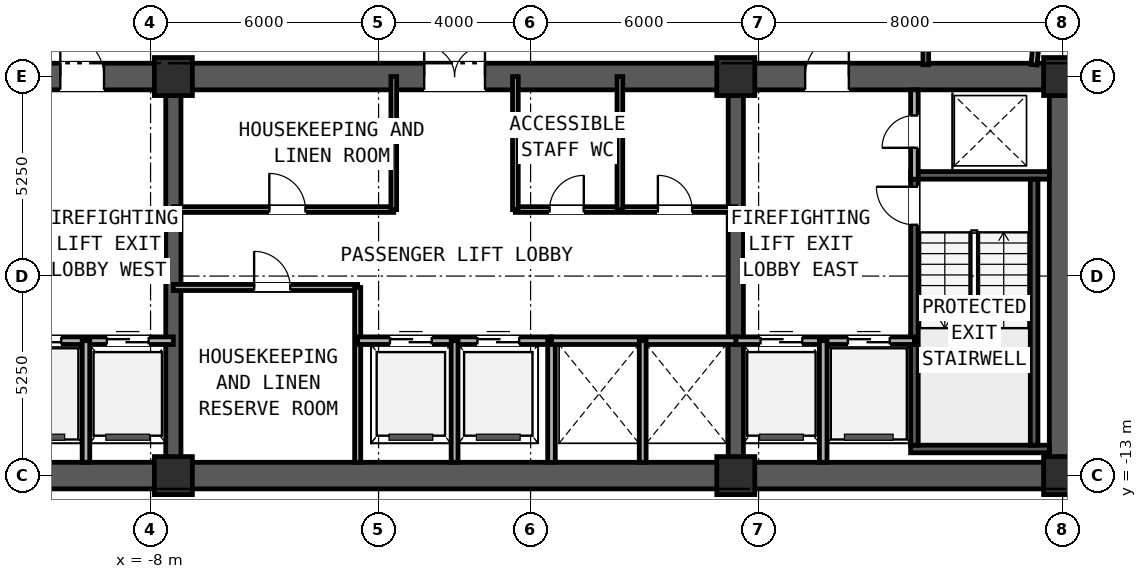
"""IFC4 building model, lengths in metres.
Left out: names, types, materials, properties, quantities, classifications, styles, units other than length and angle.
Written with IfcOpenShell. Run it as: python <this file> out.ifc"""

import sys

from ifc_helpers import new_model, si_unit, direction, frame, frame_2d, origin, origin_2d, place, context, subcontext, project, spatial, rectangle, extrude, element, fill, save


model = new_model("IFC4")
c1 = context("Model", 3, precision=1e-05, world=origin(), true_north=direction((0.0, 1.0)))
c2 = subcontext(c1, "Body", "Model", "MODEL_VIEW")
j1 = project(units=[si_unit("LENGTHUNIT", "METRE"), si_unit("PLANEANGLEUNIT", "RADIAN")], contexts=[c1])
p1 = place(None, origin())
s1 = spatial("IfcSite", under=j1, at=p1, CompositionType="ELEMENT")
p2 = place(p1, origin())
s2 = spatial("IfcBuilding", under=s1, at=p2, CompositionType="ELEMENT")
p3 = place(p2, frame((0.0, 0.0, 142.8)))
s3 = spatial("IfcBuildingStorey", under=s2, at=p3, CompositionType="ELEMENT", Elevation=142.8)
p4 = place(p3, frame((-16.35, -13.0, 0.0), z_axis=(0.0, 0.0, 1.0), x_axis=(1.0, 0.0, 0.0)))
e1 = element("IfcWall", 1, at=p4, inside=s3, PredefinedType="SHEAR", context=c2, shape_type="SweptSolid", body=[
    extrude(rectangle(XDim=32.7, YDim=0.7, at=frame_2d((16.35, 0.0))), origin(), (0.0, 0.0, 1.0), 2.91),
])
p5 = place(p3, frame((-16.35, -2.5, 0.0), z_axis=(0.0, 0.0, 1.0), x_axis=(1.0, 0.0, 0.0)))
e2 = element("IfcWall", 2, at=p5, inside=s3, PredefinedType="SHEAR", context=c2, shape_type="SweptSolid", body=[
    extrude(rectangle(XDim=32.7, YDim=0.7, at=frame_2d((16.35, 0.0))), origin(), (0.0, 0.0, 1.0), 2.91),
])
p6 = place(p5, frame((5.975, 0.0, 0.0)))
e3 = element("IfcOpeningElement", 3, at=p6, cuts=e2, PredefinedType="OPENING", context=c2, shape_type="SweptSolid", body=[
    extrude(rectangle(XDim=1.15, YDim=2.0, at=frame_2d((0.575, 1.0))), frame((0.0, 0.36, 0.0), z_axis=(0.0, -1.0, 0.0), x_axis=(1.0, 0.0, 0.0)), (0.0, 0.0, 1.0), 0.72),
])
p7 = place(p5, frame((15.55, 0.0, 0.0)))
e4 = element("IfcOpeningElement", 4, at=p7, cuts=e2, PredefinedType="OPENING", context=c2, shape_type="SweptSolid", body=[
    extrude(rectangle(XDim=1.6, YDim=2.0, at=frame_2d((0.8, 1.0))), frame((0.0, 0.36, 0.0), z_axis=(0.0, -1.0, 0.0), x_axis=(1.0, 0.0, 0.0)), (0.0, 0.0, 1.0), 0.72),
])
p8 = place(p5, frame((25.575, 0.0, 0.0)))
e5 = element("IfcOpeningElement", 5, at=p8, cuts=e2, PredefinedType="OPENING", context=c2, shape_type="SweptSolid", body=[
    extrude(rectangle(XDim=1.15, YDim=2.0, at=frame_2d((0.575, 1.0))), frame((0.0, 0.36, 0.0), z_axis=(0.0, -1.0, 0.0), x_axis=(1.0, 0.0, 0.0)), (0.0, 0.0, 1.0), 0.72),
])
p9 = place(p3, frame((16.0, -12.65, 0.0), z_axis=(0.0, 0.0, 1.0), x_axis=(0.0, 1.0, 0.0)))
e6 = element("IfcWall", 6, at=p9, inside=s3, PredefinedType="SHEAR", context=c2, shape_type="SweptSolid", body=[
    extrude(rectangle(XDim=9.8, YDim=0.7, at=frame_2d((4.9, 0.0))), origin(), (0.0, 0.0, 1.0), 2.91),
])
for number, where, z_axis, x_axis in (
    (7, (-7.4, -12.65, 0.0), (0.0, 0.0, 1.0), (0.0, 1.0, 0.0)),
    (8, (7.4, -12.65, 0.0), (0.0, 0.0, 1.0), (0.0, 1.0, 0.0)),
):
    element("IfcWall", number, at=place(p3, frame(where, z_axis=z_axis, x_axis=x_axis)), inside=s3, PredefinedType="SHEAR", context=c2, shape_type="SweptSolid", body=[
        extrude(rectangle(XDim=9.8, YDim=0.4, at=frame_2d((4.9, 0.0))), origin(), (0.0, 0.0, 1.0), 3.19),
    ])
for number, where, z_axis, x_axis in (
    (9, (12.0, -12.3, 0.0), (0.0, 0.0, 1.0), (1.0, 0.0, 0.0)),
    (10, (12.0, -5.1, 0.0), (0.0, 0.0, 1.0), (1.0, 0.0, 0.0)),
):
    element("IfcWall", number, at=place(p3, frame(where, z_axis=z_axis, x_axis=x_axis)), inside=s3, PredefinedType="SOLIDWALL", context=c2, shape_type="SweptSolid", body=[
        extrude(rectangle(XDim=3.65, YDim=0.2, at=frame_2d((1.825, 0.0))), origin(), (0.0, 0.0, 1.0), 3.19),
    ])
p10 = place(p3, frame((12.1, -12.2, 0.0), z_axis=(0.0, 0.0, 1.0), x_axis=(0.0, 1.0, 0.0)))
e11 = element("IfcWall", 11, at=p10, inside=s3, PredefinedType="SOLIDWALL", context=c2, shape_type="SweptSolid", body=[
    extrude(rectangle(XDim=7.0, YDim=0.2, at=frame_2d((3.5, 0.0))), origin(), (0.0, 0.0, 1.0), 3.19),
])
p11 = place(p10, frame((5.8, 0.0, 0.0)))
e12 = element("IfcOpeningElement", 12, at=p11, cuts=e11, PredefinedType="OPENING", context=c2, shape_type="SweptSolid", body=[
    extrude(rectangle(XDim=1.0, YDim=2.1, at=frame_2d((0.5, 1.05))), frame((0.0, 0.11, 0.0), z_axis=(0.0, -1.0, 0.0), x_axis=(1.0, 0.0, 0.0)), (0.0, 0.0, 1.0), 0.22),
])
p12 = place(p3, frame((15.25, -12.2, 0.0), z_axis=(0.0, 0.0, 1.0), x_axis=(0.0, 1.0, 0.0)))
e13 = element("IfcWall", 13, at=p12, inside=s3, PredefinedType="SOLIDWALL", context=c2, shape_type="SweptSolid", body=[
    extrude(rectangle(XDim=7.0, YDim=0.2, at=frame_2d((3.5, 0.0))), origin(), (0.0, 0.0, 1.0), 3.19),
])
for number, where, z_axis, x_axis in (
    (14, (-7.4, -13.0, 0.0), (0.0, 0.0, 1.0), (1.0, 0.0, 0.0)),
    (15, (7.4, -13.0, 0.0), (0.0, 0.0, 1.0), (1.0, 0.0, 0.0)),
    (16, (16.0, -13.0, 0.0), (0.0, 0.0, 1.0), (1.0, 0.0, 0.0)),
    (17, (-7.4, -2.5, 0.0), (0.0, 0.0, 1.0), (1.0, 0.0, 0.0)),
    (18, (7.4, -2.5, 0.0), (0.0, 0.0, 1.0), (1.0, 0.0, 0.0)),
    (19, (16.0, -2.5, 0.0), (0.0, 0.0, 1.0), (1.0, 0.0, 0.0)),
):
    element("IfcColumn", number, at=place(p3, frame(where, z_axis=z_axis, x_axis=x_axis)), inside=s3, PredefinedType="COLUMN", context=c2, shape_type="SweptSolid", body=[
        extrude(rectangle(XDim=1.0, YDim=1.0, at=origin_2d()), origin(), (0.0, 0.0, 1.0), 3.45),
    ])
p13 = place(p3, frame((-26.695, -13.016, 0.0), z_axis=(0.0, 0.0, 1.0), x_axis=(0.995396268366, -0.095845025554, 0.0)))
e20 = element("IfcWall", 20, at=p13, inside=s3, PredefinedType="STANDARD", context=c2, shape_type="SweptSolid", body=[
    extrude(rectangle(XDim=49.6, YDim=0.24, at=frame_2d((24.8, 0.0))), origin(), (0.0, 0.0, 1.0), 3.19),
])
p14 = place(p13, frame((6.044, 0.0, 0.7)))
e21 = element("IfcOpeningElement", 21, at=p14, cuts=e20, PredefinedType="OPENING", context=c2, shape_type="SweptSolid", body=[
    extrude(rectangle(XDim=1.8, YDim=1.5, at=frame_2d((0.9, 0.75))), frame((0.0, 0.13, 0.0), z_axis=(0.0, -1.0, 0.0), x_axis=(1.0, 0.0, 0.0)), (0.0, 0.0, 1.0), 0.26),
])
p15 = place(p13, frame((41.756, 0.0, 0.7)))
e22 = element("IfcOpeningElement", 22, at=p15, cuts=e20, PredefinedType="OPENING", context=c2, shape_type="SweptSolid", body=[
    extrude(rectangle(XDim=1.8, YDim=1.5, at=frame_2d((0.9, 0.75))), frame((0.0, 0.13, 0.0), z_axis=(0.0, -1.0, 0.0), x_axis=(1.0, 0.0, 0.0)), (0.0, 0.0, 1.0), 0.26),
])
p16 = place(p3, frame((12.1, -5.2, 0.0), z_axis=(0.0, 0.0, 1.0), x_axis=(0.0, 1.0, 0.0)))
e23 = element("IfcWall", 23, at=p16, inside=s3, PredefinedType="PARTITIONING", context=c2, shape_type="SweptSolid", body=[
    extrude(rectangle(XDim=2.35, YDim=0.2, at=frame_2d((1.175, 0.0))), origin(), (0.0, 0.0, 1.0), 2.225),
])
p17 = place(p16, frame((0.825, 0.0, 0.0)))
e24 = element("IfcOpeningElement", 24, at=p17, cuts=e23, PredefinedType="OPENING", context=c2, shape_type="SweptSolid", body=[
    extrude(rectangle(XDim=0.85, YDim=2.05, at=frame_2d((0.425, 1.025))), frame((0.0, 0.11, 0.0), z_axis=(0.0, -1.0, 0.0), x_axis=(1.0, 0.0, 0.0)), (0.0, 0.0, 1.0), 0.22),
])
p18 = place(p3, frame((-12.1, -9.45, 0.0), z_axis=(0.0, 0.0, 1.0), x_axis=(1.0, 0.0, 0.0)))
e25 = element("IfcWall", 25, at=p18, inside=s3, PredefinedType="PARTITIONING", context=c2, shape_type="SweptSolid", body=[
    extrude(rectangle(XDim=4.7, YDim=0.2, at=frame_2d((2.35, 0.0))), origin(), (0.0, 0.0, 1.0), 3.19),
])
p19 = place(p18, frame((0.65, 0.0, 0.0)))
e26 = element("IfcOpeningElement", 26, at=p19, cuts=e25, PredefinedType="OPENING", context=c2, shape_type="SweptSolid", body=[
    extrude(rectangle(XDim=1.1, YDim=2.2, at=frame_2d((0.55, 1.1))), frame((0.0, 0.11, 0.0), z_axis=(0.0, -1.0, 0.0), x_axis=(1.0, 0.0, 0.0)), (0.0, 0.0, 1.0), 0.22),
])
p20 = place(p18, frame((2.95, 0.0, 0.0)))
e27 = element("IfcOpeningElement", 27, at=p20, cuts=e25, PredefinedType="OPENING", context=c2, shape_type="SweptSolid", body=[
    extrude(rectangle(XDim=1.1, YDim=2.2, at=frame_2d((0.55, 1.1))), frame((0.0, 0.11, 0.0), z_axis=(0.0, -1.0, 0.0), x_axis=(1.0, 0.0, 0.0)), (0.0, 0.0, 1.0), 0.22),
])
p21 = place(p3, frame((-9.7, -12.65, 0.0), z_axis=(0.0, 0.0, 1.0), x_axis=(0.0, 1.0, 0.0)))
e28 = element("IfcWall", 28, at=p21, inside=s3, PredefinedType="PARTITIONING", context=c2, shape_type="SweptSolid", body=[
    extrude(rectangle(XDim=3.2, YDim=0.2, at=frame_2d((1.6, 0.0))), origin(), (0.0, 0.0, 1.0), 2.225),
])
p22 = place(p3, frame((7.4, -9.45, 0.0), z_axis=(0.0, 0.0, 1.0), x_axis=(1.0, 0.0, 0.0)))
e29 = element("IfcWall", 29, at=p22, inside=s3, PredefinedType="PARTITIONING", context=c2, shape_type="SweptSolid", body=[
    extrude(rectangle(XDim=4.7, YDim=0.2, at=frame_2d((2.35, 0.0))), origin(), (0.0, 0.0, 1.0), 3.19),
])
p23 = place(p22, frame((2.95, 0.0, 0.0)))
e30 = element("IfcOpeningElement", 30, at=p23, cuts=e29, PredefinedType="OPENING", context=c2, shape_type="SweptSolid", body=[
    extrude(rectangle(XDim=1.1, YDim=2.2, at=frame_2d((0.55, 1.1))), frame((0.0, 0.11, 0.0), z_axis=(0.0, -1.0, 0.0), x_axis=(1.0, 0.0, 0.0)), (0.0, 0.0, 1.0), 0.22),
])
p24 = place(p22, frame((0.65, 0.0, 0.0)))
e31 = element("IfcOpeningElement", 31, at=p24, cuts=e29, PredefinedType="OPENING", context=c2, shape_type="SweptSolid", body=[
    extrude(rectangle(XDim=1.1, YDim=2.2, at=frame_2d((0.55, 1.1))), frame((0.0, 0.11, 0.0), z_axis=(0.0, -1.0, 0.0), x_axis=(1.0, 0.0, 0.0)), (0.0, 0.0, 1.0), 0.22),
])
p25 = place(p3, frame((9.7, -12.65, 0.0), z_axis=(0.0, 0.0, 1.0), x_axis=(0.0, 1.0, 0.0)))
e32 = element("IfcWall", 32, at=p25, inside=s3, PredefinedType="PARTITIONING", context=c2, shape_type="SweptSolid", body=[
    extrude(rectangle(XDim=3.2, YDim=0.2, at=frame_2d((1.6, 0.0))), origin(), (0.0, 0.0, 1.0), 2.225),
])
p26 = place(p3, frame((-7.4, -8.05, 0.0), z_axis=(0.0, 0.0, 1.0), x_axis=(1.0, 0.0, 0.0)))
e33 = element("IfcWall", 33, at=p26, inside=s3, PredefinedType="PARTITIONING", context=c2, shape_type="SweptSolid", body=[
    extrude(rectangle(XDim=4.85, YDim=0.16, at=frame_2d((2.425, 0.0))), origin(), (0.0, 0.0, 1.0), 3.19),
])
p27 = place(p26, frame((2.125, 0.0, 0.0)))
e34 = element("IfcOpeningElement", 34, at=p27, cuts=e33, PredefinedType="OPENING", context=c2, shape_type="SweptSolid", body=[
    extrude(rectangle(XDim=0.95, YDim=2.15, at=frame_2d((0.475, 1.075))), frame((0.0, 0.09, 0.0), z_axis=(0.0, -1.0, 0.0), x_axis=(1.0, 0.0, 0.0)), (0.0, 0.0, 1.0), 0.18),
])
p28 = place(p3, frame((-2.55, -12.65, 0.0), z_axis=(0.0, 0.0, 1.0), x_axis=(0.0, 1.0, 0.0)))
e35 = element("IfcWall", 35, at=p28, inside=s3, PredefinedType="PARTITIONING", context=c2, shape_type="SweptSolid", body=[
    extrude(rectangle(XDim=4.6, YDim=0.16, at=frame_2d((2.3, 0.0))), origin(), (0.0, 0.0, 1.0), 2.225),
])
p29 = place(p3, frame((-2.55, -9.45, 0.0), z_axis=(0.0, 0.0, 1.0), x_axis=(1.0, 0.0, 0.0)))
e36 = element("IfcWall", 36, at=p29, inside=s3, PredefinedType="PARTITIONING", context=c2, shape_type="SweptSolid", body=[
    extrude(rectangle(XDim=5.1, YDim=0.2, at=frame_2d((2.55, 0.0))), origin(), (0.0, 0.0, 1.0), 3.19),
])
p30 = place(p29, frame((0.85, 0.0, 0.0)))
e37 = element("IfcOpeningElement", 37, at=p30, cuts=e36, PredefinedType="OPENING", context=c2, shape_type="SweptSolid", body=[
    extrude(rectangle(XDim=1.1, YDim=2.2, at=frame_2d((0.55, 1.1))), frame((0.0, 0.11, 0.0), z_axis=(0.0, -1.0, 0.0), x_axis=(1.0, 0.0, 0.0)), (0.0, 0.0, 1.0), 0.22),
])
p31 = place(p29, frame((3.15, 0.0, 0.0)))
e38 = element("IfcOpeningElement", 38, at=p31, cuts=e36, PredefinedType="OPENING", context=c2, shape_type="SweptSolid", body=[
    extrude(rectangle(XDim=1.1, YDim=2.2, at=frame_2d((0.55, 1.1))), frame((0.0, 0.11, 0.0), z_axis=(0.0, -1.0, 0.0), x_axis=(1.0, 0.0, 0.0)), (0.0, 0.0, 1.0), 0.22),
])
p32 = place(p3, frame((0.0, -12.65, 0.0), z_axis=(0.0, 0.0, 1.0), x_axis=(0.0, 1.0, 0.0)))
e39 = element("IfcWall", 39, at=p32, inside=s3, PredefinedType="PARTITIONING", context=c2, shape_type="SweptSolid", body=[
    extrude(rectangle(XDim=3.2, YDim=0.18, at=frame_2d((1.6, 0.0))), origin(), (0.0, 0.0, 1.0), 2.225),
])
p33 = place(p3, frame((2.55, -12.65, 0.0), z_axis=(0.0, 0.0, 1.0), x_axis=(0.0, 1.0, 0.0)))
e40 = element("IfcWall", 40, at=p33, inside=s3, PredefinedType="PARTITIONING", context=c2, shape_type="SweptSolid", body=[
    extrude(rectangle(XDim=3.2, YDim=0.2, at=frame_2d((1.6, 0.0))), origin(), (0.0, 0.0, 1.0), 2.225),
])
p34 = place(p3, frame((2.55, -9.45, 0.0), z_axis=(0.0, 0.0, 1.0), x_axis=(1.0, 0.0, 0.0)))
e41 = element("IfcWall", 41, at=p34, inside=s3, PredefinedType="PARTITIONING", context=c2, shape_type="SweptSolid", body=[
    extrude(rectangle(XDim=4.85, YDim=0.2, at=frame_2d((2.425, 0.0))), origin(), (0.0, 0.0, 1.0), 3.19),
])
p35 = place(p3, frame((4.95, -12.65, 0.0), z_axis=(0.0, 0.0, 1.0), x_axis=(0.0, 1.0, 0.0)))
e42 = element("IfcWall", 42, at=p35, inside=s3, PredefinedType="PARTITIONING", context=c2, shape_type="SweptSolid", body=[
    extrude(rectangle(XDim=3.2, YDim=0.18, at=frame_2d((1.6, 0.0))), origin(), (0.0, 0.0, 1.0), 2.225),
])
p36 = place(p3, frame((-7.4, -6.0, 0.0), z_axis=(0.0, 0.0, 1.0), x_axis=(1.0, 0.0, 0.0)))
e43 = element("IfcWall", 43, at=p36, inside=s3, PredefinedType="PARTITIONING", context=c2, shape_type="SweptSolid", body=[
    extrude(rectangle(XDim=5.8, YDim=0.15, at=frame_2d((2.9, 0.0))), origin(), (0.0, 0.0, 1.0), 3.19),
])
p37 = place(p36, frame((2.525, 0.0, 0.0)))
e44 = element("IfcOpeningElement", 44, at=p37, cuts=e43, PredefinedType="OPENING", context=c2, shape_type="SweptSolid", body=[
    extrude(rectangle(XDim=0.95, YDim=2.15, at=frame_2d((0.475, 1.075))), frame((0.0, 0.085, 0.0), z_axis=(0.0, -1.0, 0.0), x_axis=(1.0, 0.0, 0.0)), (0.0, 0.0, 1.0), 0.17),
])
p38 = place(p3, frame((-1.6, -6.0, 0.0), z_axis=(0.0, 0.0, 1.0), x_axis=(0.0, 1.0, 0.0)))
e45 = element("IfcWall", 45, at=p38, inside=s3, PredefinedType="PARTITIONING", context=c2, shape_type="SweptSolid", body=[
    extrude(rectangle(XDim=3.5, YDim=0.15, at=frame_2d((1.75, 0.0))), origin(), (0.0, 0.0, 1.0), 2.225),
])
p39 = place(p3, frame((1.6, -6.0, 0.0), z_axis=(0.0, 0.0, 1.0), x_axis=(1.0, 0.0, 0.0)))
e46 = element("IfcWall", 46, at=p39, inside=s3, PredefinedType="PARTITIONING", context=c2, shape_type="SweptSolid", body=[
    extrude(rectangle(XDim=5.8, YDim=0.15, at=frame_2d((2.9, 0.0))), origin(), (0.0, 0.0, 1.0), 3.19),
])
p40 = place(p39, frame((0.9, 0.0, 0.0)))
e47 = element("IfcOpeningElement", 47, at=p40, cuts=e46, PredefinedType="OPENING", context=c2, shape_type="SweptSolid", body=[
    extrude(rectangle(XDim=0.9, YDim=2.1, at=frame_2d((0.45, 1.05))), frame((0.0, 0.085, 0.0), z_axis=(0.0, -1.0, 0.0), x_axis=(1.0, 0.0, 0.0)), (0.0, 0.0, 1.0), 0.17),
])
p41 = place(p39, frame((3.75, 0.0, 0.0)))
e48 = element("IfcOpeningElement", 48, at=p41, cuts=e46, PredefinedType="OPENING", context=c2, shape_type="SweptSolid", body=[
    extrude(rectangle(XDim=0.9, YDim=2.1, at=frame_2d((0.45, 1.05))), frame((0.0, 0.085, 0.0), z_axis=(0.0, -1.0, 0.0), x_axis=(1.0, 0.0, 0.0)), (0.0, 0.0, 1.0), 0.17),
])
for number, where, z_axis, x_axis in (
    (49, (1.6, -6.0, 0.0), (0.0, 0.0, 1.0), (0.0, 1.0, 0.0)),
    (50, (4.35, -6.0, 0.0), (0.0, 0.0, 1.0), (0.0, 1.0, 0.0)),
):
    element("IfcWall", number, at=place(p3, frame(where, z_axis=z_axis, x_axis=x_axis)), inside=s3, PredefinedType="PARTITIONING", context=c2, shape_type="SweptSolid", body=[
        extrude(rectangle(XDim=3.5, YDim=0.15, at=frame_2d((1.75, 0.0))), origin(), (0.0, 0.0, 1.0), 2.225),
    ])
p42 = place(p3, frame((12.4, 0.59, 0.0), z_axis=(0.0, 0.0, 1.0), x_axis=(0.0, -1.0, 0.0)))
e51 = element("IfcWall", 51, at=p42, inside=s3, PredefinedType="PARTITIONING", context=c2, shape_type="SweptSolid", body=[
    extrude(rectangle(XDim=2.78, YDim=0.15, at=frame_2d((1.39, 0.0))), origin(), (0.0, 0.0, 1.0), 2.225),
])
p43 = place(p3, frame((15.823, 3.79, 0.0), z_axis=(0.0, 0.0, 1.0), x_axis=(-0.095865726078, -0.99539427493, 0.0)))
e52 = element("IfcWall", 52, at=p43, inside=s3, PredefinedType="PARTITIONING", context=c2, shape_type="SweptSolid", body=[
    extrude(rectangle(XDim=6.008, YDim=0.16, at=frame_2d((3.004, 0.0))), origin(), (0.0, 0.0, 1.0), 2.225),
])
p44 = place(p11, origin())
e53 = element("IfcDoor", 53, at=p44, inside=s3, OperationType="SINGLE_SWING_RIGHT", PredefinedType="DOOR", context=c2, shape_type="SweptSolid", body=[
    extrude(rectangle(XDim=1.0, YDim=2.1, at=frame_2d((0.5, 1.05))), frame((0.0, 0.025, 0.0), z_axis=(0.0, -1.0, 0.0), x_axis=(1.0, 0.0, 0.0)), (0.0, 0.0, 1.0), 0.05),
])
fill(e12, e53)
p45 = place(p17, frame((0.85, 0.0, 0.0), z_axis=(0.0, 0.0, 1.0), x_axis=(-1.0, 0.0, 0.0)))
e54 = element("IfcDoor", 54, at=p45, inside=s3, OperationType="SINGLE_SWING_LEFT", PredefinedType="DOOR", context=c2, shape_type="SweptSolid", body=[
    extrude(rectangle(XDim=0.85, YDim=2.05, at=frame_2d((0.425, 1.025))), frame((0.0, 0.025, 0.0), z_axis=(0.0, -1.0, 0.0), x_axis=(1.0, 0.0, 0.0)), (0.0, 0.0, 1.0), 0.05),
])
fill(e24, e54)
p46 = place(p19, origin())
e55 = element("IfcDoor", 55, at=p46, inside=s3, OperationType="SLIDING_TO_LEFT", PredefinedType="DOOR", context=c2, shape_type="SweptSolid", body=[
    extrude(rectangle(XDim=1.1, YDim=2.2, at=frame_2d((0.55, 1.1))), frame((0.0, 0.025, 0.0), z_axis=(0.0, -1.0, 0.0), x_axis=(1.0, 0.0, 0.0)), (0.0, 0.0, 1.0), 0.05),
])
fill(e26, e55)
p47 = place(p20, origin())
e56 = element("IfcDoor", 56, at=p47, inside=s3, OperationType="SLIDING_TO_RIGHT", PredefinedType="DOOR", context=c2, shape_type="SweptSolid", body=[
    extrude(rectangle(XDim=1.1, YDim=2.2, at=frame_2d((0.55, 1.1))), frame((0.0, 0.025, 0.0), z_axis=(0.0, -1.0, 0.0), x_axis=(1.0, 0.0, 0.0)), (0.0, 0.0, 1.0), 0.05),
])
fill(e27, e56)
p48 = place(p23, origin())
e57 = element("IfcDoor", 57, at=p48, inside=s3, OperationType="SLIDING_TO_LEFT", PredefinedType="DOOR", context=c2, shape_type="SweptSolid", body=[
    extrude(rectangle(XDim=1.1, YDim=2.2, at=frame_2d((0.55, 1.1))), frame((0.0, 0.025, 0.0), z_axis=(0.0, -1.0, 0.0), x_axis=(1.0, 0.0, 0.0)), (0.0, 0.0, 1.0), 0.05),
])
fill(e30, e57)
p49 = place(p24, origin())
e58 = element("IfcDoor", 58, at=p49, inside=s3, OperationType="SLIDING_TO_RIGHT", PredefinedType="DOOR", context=c2, shape_type="SweptSolid", body=[
    extrude(rectangle(XDim=1.1, YDim=2.2, at=frame_2d((0.55, 1.1))), frame((0.0, 0.025, 0.0), z_axis=(0.0, -1.0, 0.0), x_axis=(1.0, 0.0, 0.0)), (0.0, 0.0, 1.0), 0.05),
])
fill(e31, e58)
p50 = place(p6, origin())
e59 = element("IfcDoor", 59, at=p50, inside=s3, OperationType="SINGLE_SWING_LEFT", PredefinedType="DOOR", context=c2, shape_type="SweptSolid", body=[
    extrude(rectangle(XDim=1.15, YDim=2.0, at=frame_2d((0.575, 1.0))), frame((0.0, 0.025, 0.0), z_axis=(0.0, -1.0, 0.0), x_axis=(1.0, 0.0, 0.0)), (0.0, 0.0, 1.0), 0.05),
])
fill(e3, e59)
p51 = place(p7, origin())
e60 = element("IfcDoor", 60, at=p51, inside=s3, OperationType="DOUBLE_DOOR_SINGLE_SWING", PredefinedType="DOOR", context=c2, shape_type="SweptSolid", body=[
    extrude(rectangle(XDim=1.6, YDim=2.0, at=frame_2d((0.8, 1.0))), frame((0.0, 0.025, 0.0), z_axis=(0.0, -1.0, 0.0), x_axis=(1.0, 0.0, 0.0)), (0.0, 0.0, 1.0), 0.05),
])
fill(e4, e60)
p52 = place(p8, origin())
e61 = element("IfcDoor", 61, at=p52, inside=s3, OperationType="SINGLE_SWING_RIGHT", PredefinedType="DOOR", context=c2, shape_type="SweptSolid", body=[
    extrude(rectangle(XDim=1.15, YDim=2.0, at=frame_2d((0.575, 1.0))), frame((0.0, 0.025, 0.0), z_axis=(0.0, -1.0, 0.0), x_axis=(1.0, 0.0, 0.0)), (0.0, 0.0, 1.0), 0.05),
])
fill(e5, e61)
p53 = place(p27, origin())
e62 = element("IfcDoor", 62, at=p53, inside=s3, OperationType="SINGLE_SWING_LEFT", PredefinedType="DOOR", context=c2, shape_type="SweptSolid", body=[
    extrude(rectangle(XDim=0.95, YDim=2.15, at=frame_2d((0.475, 1.075))), frame((0.0, 0.025, 0.0), z_axis=(0.0, -1.0, 0.0), x_axis=(1.0, 0.0, 0.0)), (0.0, 0.0, 1.0), 0.05),
])
fill(e34, e62)
p54 = place(p30, origin())
e63 = element("IfcDoor", 63, at=p54, inside=s3, OperationType="SLIDING_TO_RIGHT", PredefinedType="DOOR", context=c2, shape_type="SweptSolid", body=[
    extrude(rectangle(XDim=1.1, YDim=2.2, at=frame_2d((0.55, 1.1))), frame((0.0, 0.025, 0.0), z_axis=(0.0, -1.0, 0.0), x_axis=(1.0, 0.0, 0.0)), (0.0, 0.0, 1.0), 0.05),
])
fill(e37, e63)
p55 = place(p31, origin())
e64 = element("IfcDoor", 64, at=p55, inside=s3, OperationType="SLIDING_TO_RIGHT", PredefinedType="DOOR", context=c2, shape_type="SweptSolid", body=[
    extrude(rectangle(XDim=1.1, YDim=2.2, at=frame_2d((0.55, 1.1))), frame((0.0, 0.025, 0.0), z_axis=(0.0, -1.0, 0.0), x_axis=(1.0, 0.0, 0.0)), (0.0, 0.0, 1.0), 0.05),
])
fill(e38, e64)
p56 = place(p37, frame((0.95, 0.0, 0.0), z_axis=(0.0, 0.0, 1.0), x_axis=(-1.0, 0.0, 0.0)))
e65 = element("IfcDoor", 65, at=p56, inside=s3, OperationType="SINGLE_SWING_LEFT", PredefinedType="DOOR", context=c2, shape_type="SweptSolid", body=[
    extrude(rectangle(XDim=0.95, YDim=2.15, at=frame_2d((0.475, 1.075))), frame((0.0, 0.025, 0.0), z_axis=(0.0, -1.0, 0.0), x_axis=(1.0, 0.0, 0.0)), (0.0, 0.0, 1.0), 0.05),
])
fill(e44, e65)
p57 = place(p40, frame((0.9, 0.0, 0.0), z_axis=(0.0, 0.0, 1.0), x_axis=(-1.0, 0.0, 0.0)))
e66 = element("IfcDoor", 66, at=p57, inside=s3, OperationType="SINGLE_SWING_RIGHT", PredefinedType="DOOR", context=c2, shape_type="SweptSolid", body=[
    extrude(rectangle(XDim=0.9, YDim=2.1, at=frame_2d((0.45, 1.05))), frame((0.0, 0.025, 0.0), z_axis=(0.0, -1.0, 0.0), x_axis=(1.0, 0.0, 0.0)), (0.0, 0.0, 1.0), 0.05),
])
fill(e47, e66)
p58 = place(p41, frame((0.9, 0.0, 0.0), z_axis=(0.0, 0.0, 1.0), x_axis=(-1.0, 0.0, 0.0)))
e67 = element("IfcDoor", 67, at=p58, inside=s3, OperationType="SINGLE_SWING_LEFT", PredefinedType="DOOR", context=c2, shape_type="SweptSolid", body=[
    extrude(rectangle(XDim=0.9, YDim=2.1, at=frame_2d((0.45, 1.05))), frame((0.0, 0.025, 0.0), z_axis=(0.0, -1.0, 0.0), x_axis=(1.0, 0.0, 0.0)), (0.0, 0.0, 1.0), 0.05),
])
fill(e48, e67)
save(model, sys.argv[1])
